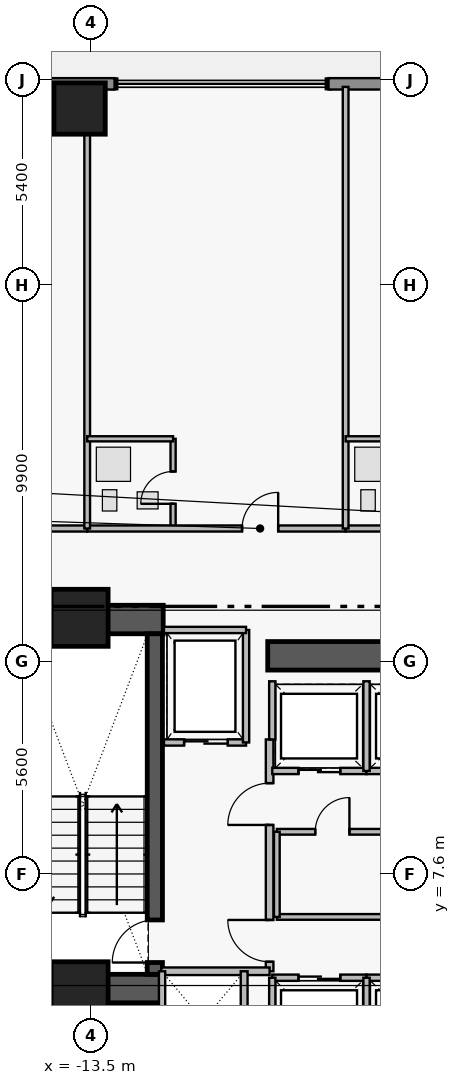
"""IFC4 building model, lengths in metres.
Left out: names, types, materials, properties, quantities, classifications, styles, units other than length and angle.
Written with IfcOpenShell. Run it as: python <this file> out.ifc"""

import sys

from ifc_helpers import new_model, si_unit, direction, frame, frame_2d, origin, origin_2d, place, context, subcontext, project, spatial, rectangle, extrude, element, fill, save


model = new_model("IFC4")
c1 = context("Model", 3, precision=1e-05, world=origin(), true_north=direction((0.0, 1.0)))
c2 = subcontext(c1, "Body", "Model", "MODEL_VIEW")
j1 = project(units=[si_unit("LENGTHUNIT", "METRE"), si_unit("PLANEANGLEUNIT", "RADIAN")], contexts=[c1])
p1 = place(None, origin())
s1 = spatial("IfcSite", under=j1, at=p1, CompositionType="ELEMENT")
p2 = place(p1, origin())
s2 = spatial("IfcBuilding", under=s1, at=p2, CompositionType="ELEMENT")
p3 = place(p2, frame((0.0, 0.0, 132.15)))
s3 = spatial("IfcBuildingStorey", under=s2, at=p3, CompositionType="ELEMENT", Elevation=132.15)
for number, where, z_axis, x_axis in (
    (1, (-16.16, 14.305, 0.0), (0.0, 0.0, 1.0), (1.0, 0.0, 0.0)),
    (2, (-16.16, 4.595, 0.0), (0.0, 0.0, 1.0), (1.0, 0.0, 0.0)),
):
    element("IfcWall", number, at=place(p3, frame(where, z_axis=z_axis, x_axis=x_axis)), inside=s3, PredefinedType="SHEAR", context=c2, shape_type="SweptSolid", body=[
        extrude(rectangle(XDim=4.56, YDim=0.75, at=frame_2d((2.28, 0.0))), origin(), (0.0, 0.0, 1.0), 3.46),
    ])
p4 = place(p3, frame((-8.85, 13.35, 0.0), z_axis=(0.0, 0.0, 1.0), x_axis=(1.0, 0.0, 0.0)))
e3 = element("IfcWall", 3, at=p4, inside=s3, PredefinedType="SHEAR", context=c2, shape_type="SweptSolid", body=[
    extrude(rectangle(XDim=7.6, YDim=0.75, at=frame_2d((3.8, 0.0))), origin(), (0.0, 0.0, 1.0), 3.43),
])
p5 = place(p3, frame((-11.82, 4.97, 0.0), z_axis=(0.0, 0.0, 1.0), x_axis=(0.0, 1.0, 0.0)))
e4 = element("IfcWall", 4, at=p5, inside=s3, PredefinedType="SHEAR", context=c2, shape_type="SweptSolid", body=[
    extrude(rectangle(XDim=8.96, YDim=0.4, at=frame_2d((4.48, 0.0))), origin(), (0.0, 0.0, 1.0), 3.46),
])
p6 = place(p5, frame((0.31, 0.0, 0.0)))
e5 = element("IfcOpeningElement", 5, at=p6, cuts=e4, PredefinedType="OPENING", context=c2, shape_type="SweptSolid", body=[
    extrude(rectangle(XDim=1.12, YDim=2.22, at=frame_2d((0.56, 1.11))), frame((0.0, 0.21, 0.0), z_axis=(0.0, -1.0, 0.0), x_axis=(1.0, 0.0, 0.0)), (0.0, 0.0, 1.0), 0.42),
])
for number, where, z_axis, x_axis in (
    (6, (-13.8, 14.35, 0.0), (0.0, 0.0, 1.0), (1.0, 0.0, 0.0)),
    (7, (-13.8, 4.55, 0.0), (0.0, 0.0, 1.0), (1.0, 0.0, 0.0)),
):
    element("IfcColumn", number, at=place(p3, frame(where, z_axis=z_axis, x_axis=x_axis)), inside=s3, PredefinedType="COLUMN", context=c2, shape_type="SweptSolid", body=[
        extrude(rectangle(XDim=1.5, YDim=1.5, at=origin_2d()), origin(), (0.0, 0.0, 1.0), 3.65),
    ])
p7 = place(p3, frame((-13.8, 27.75, 0.0), z_axis=(0.0, 0.0, 1.0), x_axis=(1.0, 0.0, 0.0)))
e8 = element("IfcColumn", 8, at=p7, inside=s3, PredefinedType="COLUMN", context=c2, shape_type="SweptSolid", body=[
    extrude(rectangle(XDim=1.35, YDim=1.35, at=origin_2d()), origin(), (0.0, 0.0, 1.0), 3.65),
])
p8 = place(p3, frame((-14.72, 28.4, 0.0), z_axis=(0.0, 0.0, 1.0), x_axis=(1.0, 0.0, 0.0)))
e9 = element("IfcWall", 9, at=p8, inside=s3, PredefinedType="STANDARD", context=c2, shape_type="SweptSolid", body=[
    extrude(rectangle(XDim=1.84, YDim=0.3, at=frame_2d((0.92, 0.0))), origin(), (0.0, 0.0, 1.0), 3.43),
])
p9 = place(p3, frame((-7.25, 28.4, 0.0), z_axis=(0.0, 0.0, 1.0), x_axis=(1.0, 0.0, 0.0)))
e10 = element("IfcWall", 10, at=p9, inside=s3, PredefinedType="STANDARD", context=c2, shape_type="SweptSolid", body=[
    extrude(rectangle(XDim=3.57, YDim=0.3, at=frame_2d((1.785, 0.0))), origin(), (0.0, 0.0, 1.0), 3.43),
])
p10 = place(p3, frame((-8.8, 5.05, 0.0), z_axis=(0.0, 0.0, 1.0), x_axis=(0.0, 1.0, 0.0)))
e11 = element("IfcWall", 11, at=p10, inside=s3, PredefinedType="PARTITIONING", context=c2, shape_type="SweptSolid", body=[
    extrude(rectangle(XDim=6.1, YDim=0.2, at=frame_2d((3.05, 0.0))), origin(), (0.0, 0.0, 1.0), 3.43),
])
p11 = place(p10, frame((0.25, 0.0, 0.0)))
e12 = element("IfcOpeningElement", 12, at=p11, cuts=e11, PredefinedType="OPENING", context=c2, shape_type="SweptSolid", body=[
    extrude(rectangle(XDim=1.1, YDim=2.2, at=frame_2d((0.55, 1.1))), frame((0.0, 0.11, 0.0), z_axis=(0.0, -1.0, 0.0), x_axis=(1.0, 0.0, 0.0)), (0.0, 0.0, 1.0), 0.22),
])
p12 = place(p10, frame((3.85, 0.0, 0.0)))
e13 = element("IfcOpeningElement", 13, at=p12, cuts=e11, PredefinedType="OPENING", context=c2, shape_type="SweptSolid", body=[
    extrude(rectangle(XDim=1.1, YDim=2.2, at=frame_2d((0.55, 1.1))), frame((0.0, 0.11, 0.0), z_axis=(0.0, -1.0, 0.0), x_axis=(1.0, 0.0, 0.0)), (0.0, 0.0, 1.0), 0.22),
])
p13 = place(p3, frame((-11.58, 11.07, 0.0), z_axis=(0.0, 0.0, 1.0), x_axis=(1.0, 0.0, 0.0)))
e14 = element("IfcWall", 14, at=p13, inside=s3, PredefinedType="PARTITIONING", context=c2, shape_type="SweptSolid", body=[
    extrude(rectangle(XDim=2.16, YDim=0.165, at=frame_2d((1.08, 0.0))), origin(), (0.0, 0.0, 1.0), 3.43),
])
p14 = place(p13, frame((0.53, 0.0, 0.0)))
e15 = element("IfcOpeningElement", 15, at=p14, cuts=e14, PredefinedType="OPENING", context=c2, shape_type="SweptSolid", body=[
    extrude(rectangle(XDim=1.15, YDim=2.25, at=frame_2d((0.575, 1.125))), frame((0.0, 0.093, 0.0), z_axis=(0.0, -1.0, 0.0), x_axis=(1.0, 0.0, 0.0)), (0.0, 0.0, 1.0), 0.185),
])
p15 = place(p3, frame((-8.73, 4.88, 0.0), z_axis=(0.0, 0.0, 1.0), x_axis=(1.0, 0.0, 0.0)))
e16 = element("IfcWall", 16, at=p15, inside=s3, PredefinedType="PARTITIONING", context=c2, shape_type="SweptSolid", body=[
    extrude(rectangle(XDim=2.48, YDim=0.165, at=frame_2d((1.24, 0.0))), origin(), (0.0, 0.0, 1.0), 3.43),
])
p16 = place(p15, frame((0.69, 0.0, 0.0)))
e17 = element("IfcOpeningElement", 17, at=p16, cuts=e16, PredefinedType="OPENING", context=c2, shape_type="SweptSolid", body=[
    extrude(rectangle(XDim=1.1, YDim=2.25, at=frame_2d((0.55, 1.125))), frame((0.0, 0.093, 0.0), z_axis=(0.0, -1.0, 0.0), x_axis=(1.0, 0.0, 0.0)), (0.0, 0.0, 1.0), 0.185),
])
p17 = place(p3, frame((-6.25, 4.88, 0.0), z_axis=(0.0, 0.0, 1.0), x_axis=(1.0, 0.0, 0.0)))
e18 = element("IfcWall", 18, at=p17, inside=s3, PredefinedType="PARTITIONING", context=c2, shape_type="SweptSolid", body=[
    extrude(rectangle(XDim=2.5, YDim=0.165, at=frame_2d((1.25, 0.0))), origin(), (0.0, 0.0, 1.0), 3.43),
])
p18 = place(p17, frame((0.7, 0.0, 0.0)))
e19 = element("IfcOpeningElement", 19, at=p18, cuts=e18, PredefinedType="OPENING", context=c2, shape_type="SweptSolid", body=[
    extrude(rectangle(XDim=1.1, YDim=2.25, at=frame_2d((0.55, 1.125))), frame((0.0, 0.093, 0.0), z_axis=(0.0, -1.0, 0.0), x_axis=(1.0, 0.0, 0.0)), (0.0, 0.0, 1.0), 0.185),
])
p19 = place(p3, frame((-8.73, 10.32, 0.0), z_axis=(0.0, 0.0, 1.0), x_axis=(1.0, 0.0, 0.0)))
e20 = element("IfcWall", 20, at=p19, inside=s3, PredefinedType="PARTITIONING", context=c2, shape_type="SweptSolid", body=[
    extrude(rectangle(XDim=2.48, YDim=0.165, at=frame_2d((1.24, 0.0))), origin(), (0.0, 0.0, 1.0), 3.43),
])
p20 = place(p19, frame((0.69, 0.0, 0.0)))
e21 = element("IfcOpeningElement", 21, at=p20, cuts=e20, PredefinedType="OPENING", context=c2, shape_type="SweptSolid", body=[
    extrude(rectangle(XDim=1.1, YDim=2.25, at=frame_2d((0.55, 1.125))), frame((0.0, 0.093, 0.0), z_axis=(0.0, -1.0, 0.0), x_axis=(1.0, 0.0, 0.0)), (0.0, 0.0, 1.0), 0.185),
])
p21 = place(p3, frame((-6.25, 10.32, 0.0), z_axis=(0.0, 0.0, 1.0), x_axis=(1.0, 0.0, 0.0)))
e22 = element("IfcWall", 22, at=p21, inside=s3, PredefinedType="PARTITIONING", context=c2, shape_type="SweptSolid", body=[
    extrude(rectangle(XDim=2.5, YDim=0.165, at=frame_2d((1.25, 0.0))), origin(), (0.0, 0.0, 1.0), 3.43),
])
p22 = place(p21, frame((0.7, 0.0, 0.0)))
e23 = element("IfcOpeningElement", 23, at=p22, cuts=e22, PredefinedType="OPENING", context=c2, shape_type="SweptSolid", body=[
    extrude(rectangle(XDim=1.1, YDim=2.25, at=frame_2d((0.55, 1.125))), frame((0.0, 0.093, 0.0), z_axis=(0.0, -1.0, 0.0), x_axis=(1.0, 0.0, 0.0)), (0.0, 0.0, 1.0), 0.185),
])
p23 = place(p3, frame((-8.61, 8.72, 0.0), z_axis=(0.0, 0.0, 1.0), x_axis=(1.0, 0.0, 0.0)))
e24 = element("IfcWall", 24, at=p23, inside=s3, PredefinedType="PARTITIONING", context=c2, shape_type="SweptSolid", body=[
    extrude(rectangle(XDim=2.92, YDim=0.15, at=frame_2d((1.46, 0.0))), origin(), (0.0, 0.0, 1.0), 3.43),
])
p24 = place(p23, frame((1.01, 0.0, 0.0)))
e25 = element("IfcOpeningElement", 25, at=p24, cuts=e24, PredefinedType="OPENING", context=c2, shape_type="SweptSolid", body=[
    extrude(rectangle(XDim=0.9, YDim=2.15, at=frame_2d((0.45, 1.075))), frame((0.0, 0.085, 0.0), z_axis=(0.0, -1.0, 0.0), x_axis=(1.0, 0.0, 0.0)), (0.0, 0.0, 1.0), 0.17),
])
p25 = place(p3, frame((-20.6, 16.7, 0.0), z_axis=(0.0, 0.0, 1.0), x_axis=(1.0, 0.0, 0.0)))
e26 = element("IfcWall", 26, at=p25, inside=s3, PredefinedType="PARTITIONING", context=c2, shape_type="SweptSolid", body=[
    extrude(rectangle(XDim=7.0, YDim=0.16, at=frame_2d((3.5, 0.0))), origin(), (0.0, 0.0, 1.0), 3.43),
])
p26 = place(p25, frame((4.15, 0.0, 0.0)))
e27 = element("IfcOpeningElement", 27, at=p26, cuts=e26, PredefinedType="OPENING", context=c2, shape_type="SweptSolid", body=[
    extrude(rectangle(XDim=1.0, YDim=2.15, at=frame_2d((0.5, 1.075))), frame((0.0, 0.09, 0.0), z_axis=(0.0, -1.0, 0.0), x_axis=(1.0, 0.0, 0.0)), (0.0, 0.0, 1.0), 0.18),
])
p27 = place(p3, frame((-11.34, 16.7, 0.0), z_axis=(0.0, 0.0, 1.0), x_axis=(0.0, 1.0, 0.0)))
e28 = element("IfcWall", 28, at=p27, inside=s3, PredefinedType="PLUMBINGWALL", context=c2, shape_type="SweptSolid", body=[
    extrude(rectangle(XDim=2.36, YDim=0.135, at=frame_2d((1.18, 0.0))), origin(), (0.0, 0.0, 1.0), 3.43),
])
p28 = place(p27, frame((0.65, 0.0, 0.0)))
e29 = element("IfcOpeningElement", 29, at=p28, cuts=e28, PredefinedType="OPENING", context=c2, shape_type="SweptSolid", body=[
    extrude(rectangle(XDim=0.85, YDim=2.1, at=frame_2d((0.425, 1.05))), frame((0.0, 0.077, 0.0), z_axis=(0.0, -1.0, 0.0), x_axis=(1.0, 0.0, 0.0)), (0.0, 0.0, 1.0), 0.155),
])
p29 = place(p3, frame((-13.6, 16.7, 0.0), z_axis=(0.0, 0.0, 1.0), x_axis=(1.0, 0.0, 0.0)))
e30 = element("IfcWall", 30, at=p29, inside=s3, PredefinedType="PARTITIONING", context=c2, shape_type="SweptSolid", body=[
    extrude(rectangle(XDim=6.8, YDim=0.16, at=frame_2d((3.4, 0.0))), origin(), (0.0, 0.0, 1.0), 2.973),
])
p30 = place(p29, frame((4.075, 0.0, 0.0)))
e31 = element("IfcOpeningElement", 31, at=p30, cuts=e30, PredefinedType="OPENING", context=c2, shape_type="SweptSolid", body=[
    extrude(rectangle(XDim=0.95, YDim=2.15, at=frame_2d((0.475, 1.075))), frame((0.0, 0.09, 0.0), z_axis=(0.0, -1.0, 0.0), x_axis=(1.0, 0.0, 0.0)), (0.0, 0.0, 1.0), 0.18),
])
p31 = place(p3, frame((-6.8, 16.7, 0.0), z_axis=(0.0, 0.0, 1.0), x_axis=(1.0, 0.0, 0.0)))
e32 = element("IfcWall", 32, at=p31, inside=s3, PredefinedType="PARTITIONING", context=c2, shape_type="SweptSolid", body=[
    extrude(rectangle(XDim=6.8, YDim=0.16, at=frame_2d((3.4, 0.0))), origin(), (0.0, 0.0, 1.0), 2.973),
])
p32 = place(p31, frame((4.075, 0.0, 0.0)))
e33 = element("IfcOpeningElement", 33, at=p32, cuts=e32, PredefinedType="OPENING", context=c2, shape_type="SweptSolid", body=[
    extrude(rectangle(XDim=0.95, YDim=2.15, at=frame_2d((0.475, 1.075))), frame((0.0, 0.09, 0.0), z_axis=(0.0, -1.0, 0.0), x_axis=(1.0, 0.0, 0.0)), (0.0, 0.0, 1.0), 0.18),
])
p33 = place(p3, frame((-11.65, 5.05, 0.0), z_axis=(0.0, 0.0, 1.0), x_axis=(1.0, 0.0, 0.0)))
e34 = element("IfcWall", 34, at=p33, inside=s3, PredefinedType="PARTITIONING", context=c2, shape_type="SweptSolid", body=[
    extrude(rectangle(XDim=2.85, YDim=0.2, at=frame_2d((1.425, 0.0))), origin(), (0.0, 0.0, 1.0), 3.43),
])
p34 = place(p3, frame((-9.42, 11.07, 0.0), z_axis=(0.0, 0.0, 1.0), x_axis=(0.0, 1.0, 0.0)))
e35 = element("IfcWall", 35, at=p34, inside=s3, PredefinedType="PARTITIONING", context=c2, shape_type="SweptSolid", body=[
    extrude(rectangle(XDim=2.96, YDim=0.165, at=frame_2d((1.48, 0.0))), origin(), (0.0, 0.0, 1.0), 3.43),
])
p35 = place(p3, frame((-11.58, 14.03, 0.0), z_axis=(0.0, 0.0, 1.0), x_axis=(1.0, 0.0, 0.0)))
e36 = element("IfcWall", 36, at=p35, inside=s3, PredefinedType="PARTITIONING", context=c2, shape_type="SweptSolid", body=[
    extrude(rectangle(XDim=2.16, YDim=0.165, at=frame_2d((1.08, 0.0))), origin(), (0.0, 0.0, 1.0), 3.43),
])
for number, where, z_axis, x_axis in (
    (37, (-8.73, 2.52, 0.0), (0.0, 0.0, 1.0), (0.0, 1.0, 0.0)),
    (38, (-6.25, 2.52, 0.0), (0.0, 0.0, 1.0), (0.0, 1.0, 0.0)),
):
    element("IfcWall", number, at=place(p3, frame(where, z_axis=z_axis, x_axis=x_axis)), inside=s3, PredefinedType="PARTITIONING", context=c2, shape_type="SweptSolid", body=[
        extrude(rectangle(XDim=2.36, YDim=0.165, at=frame_2d((1.18, 0.0))), origin(), (0.0, 0.0, 1.0), 3.43),
    ])
p36 = place(p3, frame((-8.73, 11.15, 0.0), z_axis=(0.0, 0.0, 1.0), x_axis=(0.0, 1.0, 0.0)))
e39 = element("IfcWall", 39, at=p36, inside=s3, PredefinedType="PARTITIONING", context=c2, shape_type="SweptSolid", body=[
    extrude(rectangle(XDim=1.53, YDim=0.165, at=frame_2d((0.765, 0.0))), origin(), (0.0, 0.0, 1.0), 3.43),
])
p37 = place(p3, frame((-6.25, 10.32, 0.0), z_axis=(0.0, 0.0, 1.0), x_axis=(0.0, 1.0, 0.0)))
e40 = element("IfcWall", 40, at=p37, inside=s3, PredefinedType="PARTITIONING", context=c2, shape_type="SweptSolid", body=[
    extrude(rectangle(XDim=2.36, YDim=0.165, at=frame_2d((1.18, 0.0))), origin(), (0.0, 0.0, 1.0), 3.43),
])
p38 = place(p3, frame((-9.47, 2.45, 0.0), z_axis=(0.0, 0.0, 1.0), x_axis=(0.0, 1.0, 0.0)))
e41 = element("IfcWall", 41, at=p38, inside=s3, PredefinedType="PARTITIONING", context=c2, shape_type="SweptSolid", body=[
    extrude(rectangle(XDim=2.6, YDim=0.18, at=frame_2d((1.3, 0.0))), origin(), (0.0, 0.0, 1.0), 3.43),
])
p39 = place(p3, frame((-11.63, 2.47, 0.0), z_axis=(0.0, 0.0, 1.0), x_axis=(0.0, 1.0, 0.0)))
e42 = element("IfcWall", 42, at=p39, inside=s3, PredefinedType="PARTITIONING", context=c2, shape_type="SweptSolid", body=[
    extrude(rectangle(XDim=2.58, YDim=0.165, at=frame_2d((1.29, 0.0))), origin(), (0.0, 0.0, 1.0), 3.43),
])
p40 = place(p3, frame((-8.61, 6.48, 0.0), z_axis=(0.0, 0.0, 1.0), x_axis=(1.0, 0.0, 0.0)))
e43 = element("IfcWall", 43, at=p40, inside=s3, PredefinedType="PARTITIONING", context=c2, shape_type="SweptSolid", body=[
    extrude(rectangle(XDim=2.92, YDim=0.15, at=frame_2d((1.46, 0.0))), origin(), (0.0, 0.0, 1.0), 3.43),
])
p41 = place(p3, frame((-8.61, 6.48, 0.0), z_axis=(0.0, 0.0, 1.0), x_axis=(0.0, 1.0, 0.0)))
e44 = element("IfcWall", 44, at=p41, inside=s3, PredefinedType="PARTITIONING", context=c2, shape_type="SweptSolid", body=[
    extrude(rectangle(XDim=2.24, YDim=0.15, at=frame_2d((1.12, 0.0))), origin(), (0.0, 0.0, 1.0), 3.43),
])
p42 = place(p3, frame((-13.6, 16.7, 0.0), z_axis=(0.0, 0.0, 1.0), x_axis=(0.0, 1.0, 0.0)))
e45 = element("IfcWall", 45, at=p42, inside=s3, PredefinedType="PARTITIONING", context=c2, shape_type="SweptSolid", body=[
    extrude(rectangle(XDim=11.62, YDim=0.15, at=frame_2d((5.81, 0.0))), origin(), (0.0, 0.0, 1.0), 2.503),
])
p43 = place(p3, frame((-13.6, 19.06, 0.0), z_axis=(0.0, 0.0, 1.0), x_axis=(1.0, 0.0, 0.0)))
e46 = element("IfcWall", 46, at=p43, inside=s3, PredefinedType="PLUMBINGWALL", context=c2, shape_type="SweptSolid", body=[
    extrude(rectangle(XDim=2.26, YDim=0.135, at=frame_2d((1.13, 0.0))), origin(), (0.0, 0.0, 1.0), 2.973),
])
p44 = place(p3, frame((-6.8, 16.7, 0.0), z_axis=(0.0, 0.0, 1.0), x_axis=(0.0, 1.0, 0.0)))
e47 = element("IfcWall", 47, at=p44, inside=s3, PredefinedType="PARTITIONING", context=c2, shape_type="SweptSolid", body=[
    extrude(rectangle(XDim=11.62, YDim=0.15, at=frame_2d((5.81, 0.0))), origin(), (0.0, 0.0, 1.0), 3.43),
])
p45 = place(p3, frame((-6.8, 19.06, 0.0), z_axis=(0.0, 0.0, 1.0), x_axis=(1.0, 0.0, 0.0)))
e48 = element("IfcWall", 48, at=p45, inside=s3, PredefinedType="PLUMBINGWALL", context=c2, shape_type="SweptSolid", body=[
    extrude(rectangle(XDim=2.26, YDim=0.135, at=frame_2d((1.13, 0.0))), origin(), (0.0, 0.0, 1.0), 2.973),
])
p46 = place(p6, origin())
e49 = element("IfcDoor", 49, at=p46, inside=s3, OperationType="SINGLE_SWING_LEFT", PredefinedType="DOOR", context=c2, shape_type="SweptSolid", body=[
    extrude(rectangle(XDim=1.12, YDim=2.22, at=frame_2d((0.56, 1.11))), frame((0.0, 0.025, 0.0), z_axis=(0.0, -1.0, 0.0), x_axis=(1.0, 0.0, 0.0)), (0.0, 0.0, 1.0), 0.05),
])
fill(e5, e49)
p47 = place(p11, origin())
e50 = element("IfcDoor", 50, at=p47, inside=s3, OperationType="SINGLE_SWING_RIGHT", PredefinedType="DOOR", context=c2, shape_type="SweptSolid", body=[
    extrude(rectangle(XDim=1.1, YDim=2.2, at=frame_2d((0.55, 1.1))), frame((0.0, 0.025, 0.0), z_axis=(0.0, -1.0, 0.0), x_axis=(1.0, 0.0, 0.0)), (0.0, 0.0, 1.0), 0.05),
])
fill(e12, e50)
p48 = place(p12, origin())
e51 = element("IfcDoor", 51, at=p48, inside=s3, OperationType="SINGLE_SWING_LEFT", PredefinedType="DOOR", context=c2, shape_type="SweptSolid", body=[
    extrude(rectangle(XDim=1.1, YDim=2.2, at=frame_2d((0.55, 1.1))), frame((0.0, 0.025, 0.0), z_axis=(0.0, -1.0, 0.0), x_axis=(1.0, 0.0, 0.0)), (0.0, 0.0, 1.0), 0.05),
])
fill(e13, e51)
p49 = place(p14, origin())
e52 = element("IfcDoor", 52, at=p49, inside=s3, OperationType="SLIDING_TO_LEFT", PredefinedType="DOOR", context=c2, shape_type="SweptSolid", body=[
    extrude(rectangle(XDim=1.15, YDim=2.25, at=frame_2d((0.575, 1.125))), frame((0.0, 0.025, 0.0), z_axis=(0.0, -1.0, 0.0), x_axis=(1.0, 0.0, 0.0)), (0.0, 0.0, 1.0), 0.05),
])
fill(e15, e52)
p50 = place(p16, origin())
e53 = element("IfcDoor", 53, at=p50, inside=s3, OperationType="SLIDING_TO_LEFT", PredefinedType="DOOR", context=c2, shape_type="SweptSolid", body=[
    extrude(rectangle(XDim=1.1, YDim=2.25, at=frame_2d((0.55, 1.125))), frame((0.0, 0.025, 0.0), z_axis=(0.0, -1.0, 0.0), x_axis=(1.0, 0.0, 0.0)), (0.0, 0.0, 1.0), 0.05),
])
fill(e17, e53)
p51 = place(p20, origin())
e54 = element("IfcDoor", 54, at=p51, inside=s3, OperationType="SLIDING_TO_LEFT", PredefinedType="DOOR", context=c2, shape_type="SweptSolid", body=[
    extrude(rectangle(XDim=1.1, YDim=2.25, at=frame_2d((0.55, 1.125))), frame((0.0, 0.025, 0.0), z_axis=(0.0, -1.0, 0.0), x_axis=(1.0, 0.0, 0.0)), (0.0, 0.0, 1.0), 0.05),
])
fill(e21, e54)
p52 = place(p24, origin())
e55 = element("IfcDoor", 55, at=p52, inside=s3, OperationType="SINGLE_SWING_RIGHT", PredefinedType="DOOR", context=c2, shape_type="SweptSolid", body=[
    extrude(rectangle(XDim=0.9, YDim=2.15, at=frame_2d((0.45, 1.075))), frame((0.0, 0.025, 0.0), z_axis=(0.0, -1.0, 0.0), x_axis=(1.0, 0.0, 0.0)), (0.0, 0.0, 1.0), 0.05),
])
fill(e25, e55)
p53 = place(p28, origin())
e56 = element("IfcDoor", 56, at=p53, inside=s3, OperationType="SINGLE_SWING_LEFT", PredefinedType="DOOR", context=c2, shape_type="SweptSolid", body=[
    extrude(rectangle(XDim=0.85, YDim=2.1, at=frame_2d((0.425, 1.05))), frame((0.0, 0.025, 0.0), z_axis=(0.0, -1.0, 0.0), x_axis=(1.0, 0.0, 0.0)), (0.0, 0.0, 1.0), 0.05),
])
fill(e29, e56)
p54 = place(p30, origin())
e57 = element("IfcDoor", 57, at=p54, inside=s3, OperationType="SINGLE_SWING_RIGHT", PredefinedType="DOOR", context=c2, shape_type="SweptSolid", body=[
    extrude(rectangle(XDim=0.95, YDim=2.15, at=frame_2d((0.475, 1.075))), frame((0.0, 0.025, 0.0), z_axis=(0.0, -1.0, 0.0), x_axis=(1.0, 0.0, 0.0)), (0.0, 0.0, 1.0), 0.05),
])
fill(e31, e57)
save(model, sys.argv[1])
